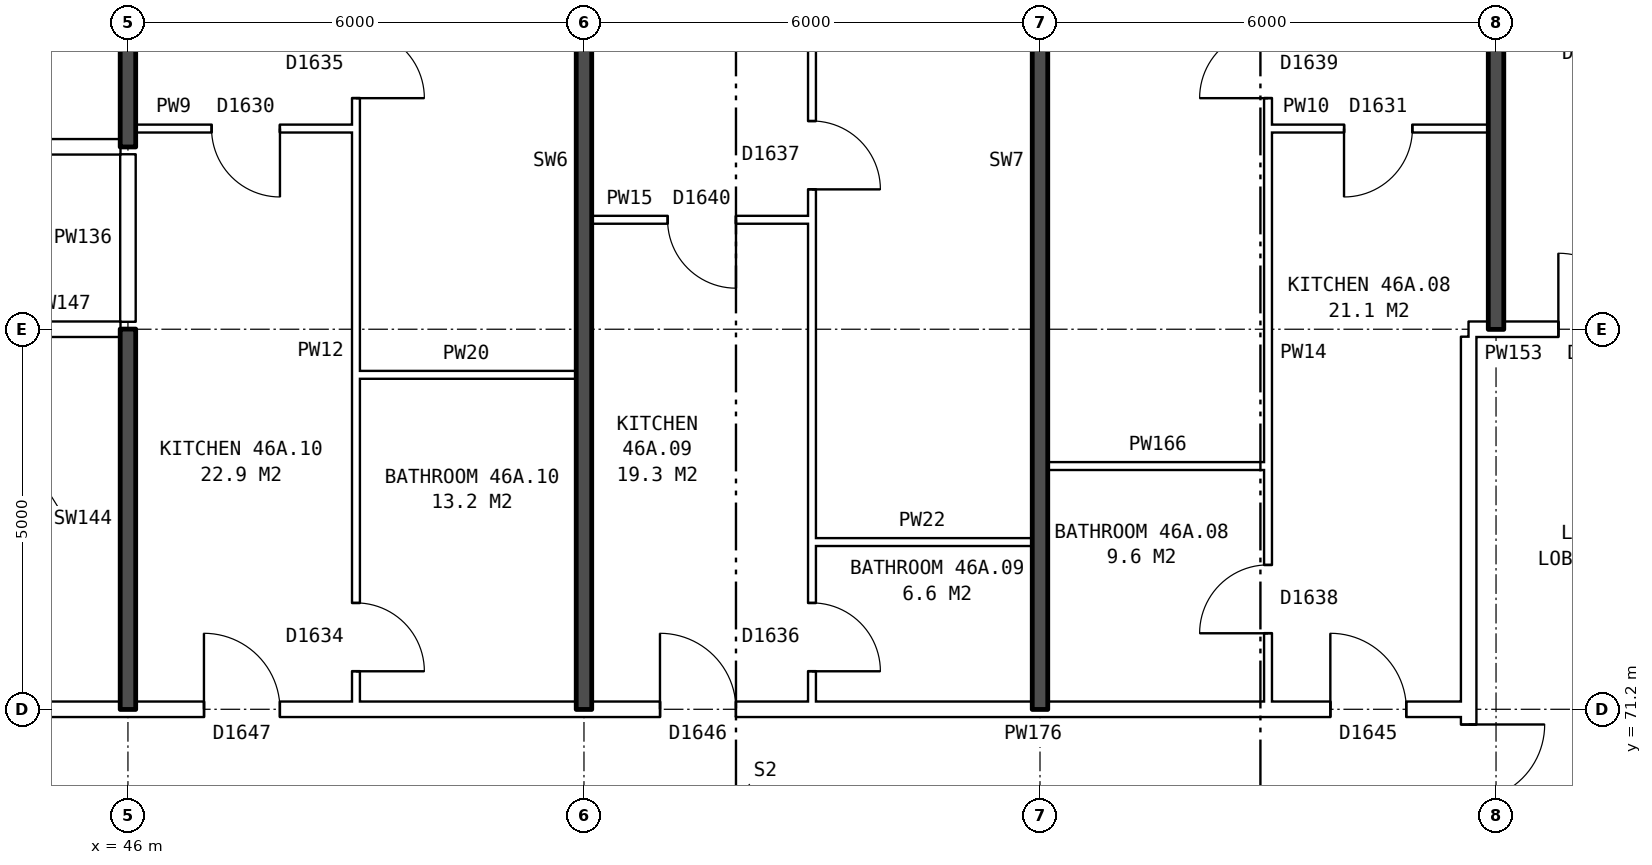
"""IFC4 building model, lengths in metres.
Left out: names, types, materials, properties, quantities, classifications, styles, units other than length and angle.
Written with IfcOpenShell. Run it as: python <this file> out.ifc"""

import sys

from ifc_helpers import new_model, si_unit, direction, frame, frame_2d, origin, place, context, subcontext, project, spatial, rectangle, extrude, element, fill, save


model = new_model("IFC4")
c1 = context("Model", 3, precision=1e-05, world=origin(), true_north=direction((0.0, 1.0)))
c2 = subcontext(c1, "Body", "Model", "MODEL_VIEW")
j1 = project(units=[si_unit("LENGTHUNIT", "METRE"), si_unit("PLANEANGLEUNIT", "RADIAN")], contexts=[c1])
p1 = place(None, origin())
s1 = spatial("IfcSite", under=j1, at=p1, CompositionType="ELEMENT")
p2 = place(p1, origin())
s2 = spatial("IfcBuilding", under=s1, at=p2, CompositionType="ELEMENT")
p3 = place(p2, frame((0.0, 0.0, 164.0)))
s3 = spatial("IfcBuildingStorey", under=s2, at=p3, CompositionType="ELEMENT", Elevation=164.0)
p4 = place(p3, frame((63.64, 63.9, 0.0), z_axis=(0.0, 0.0, 1.0), x_axis=(0.0, 1.0, 0.0)))
e1 = element("IfcWall", 1, at=p4, inside=s3, PredefinedType="PARTITIONING", context=c2, shape_type="SweptSolid", body=[
    extrude(rectangle(XDim=12.2, YDim=0.2, at=frame_2d((6.1, 0.0))), origin(), (0.0, 0.0, 1.0), 2.85),
])
p5 = place(p4, frame((5.1, 0.0, 0.0)))
e2 = element("IfcOpeningElement", 2, at=p5, cuts=e1, PredefinedType="OPENING", context=c2, shape_type="SweptSolid", body=[
    extrude(rectangle(XDim=2.0, YDim=2.1, at=frame_2d((1.0, 1.05))), frame((0.0, 0.11, 0.0), z_axis=(0.0, -1.0, 0.0), x_axis=(1.0, 0.0, 0.0)), (0.0, 0.0, 1.0), 0.22),
])
p6 = place(p3, frame((44.36, 71.2, 0.0), z_axis=(0.0, 0.0, 1.0), x_axis=(1.0, 0.0, 0.0)))
e3 = element("IfcWall", 3, at=p6, inside=s3, PredefinedType="PARTITIONING", context=c2, shape_type="SweptSolid", body=[
    extrude(rectangle(XDim=19.28, YDim=0.2, at=frame_2d((9.64, 0.0))), origin(), (0.0, 0.0, 1.0), 2.85),
])
p7 = place(p6, frame((17.46, 0.0, 0.0)))
e4 = element("IfcOpeningElement", 4, at=p7, cuts=e3, PredefinedType="OPENING", context=c2, shape_type="SweptSolid", body=[
    extrude(rectangle(XDim=1.0, YDim=2.1, at=frame_2d((0.5, 1.05))), frame((0.0, 0.11, 0.0), z_axis=(0.0, -1.0, 0.0), x_axis=(1.0, 0.0, 0.0)), (0.0, 0.0, 1.0), 0.22),
])
p8 = place(p6, frame((8.64, 0.0, 0.0)))
e5 = element("IfcOpeningElement", 5, at=p8, cuts=e3, PredefinedType="OPENING", context=c2, shape_type="SweptSolid", body=[
    extrude(rectangle(XDim=1.0, YDim=2.1, at=frame_2d((0.5, 1.05))), frame((0.0, 0.11, 0.0), z_axis=(0.0, -1.0, 0.0), x_axis=(1.0, 0.0, 0.0)), (0.0, 0.0, 1.0), 0.22),
])
p9 = place(p6, frame((2.64, 0.0, 0.0)))
e6 = element("IfcOpeningElement", 6, at=p9, cuts=e3, PredefinedType="OPENING", context=c2, shape_type="SweptSolid", body=[
    extrude(rectangle(XDim=1.0, YDim=2.1, at=frame_2d((0.5, 1.05))), frame((0.0, 0.11, 0.0), z_axis=(0.0, -1.0, 0.0), x_axis=(1.0, 0.0, 0.0)), (0.0, 0.0, 1.0), 0.22),
])
for number, where, z_axis, x_axis in (
    (7, (55.0, 73.4, 0.0), (0.0, 0.0, 1.0), (1.0, 0.0, 0.0)),
    (8, (58.1, 74.4, 0.0), (0.0, 0.0, 1.0), (1.0, 0.0, 0.0)),
    (9, (49.0, 75.6, 0.0), (0.0, 0.0, 1.0), (1.0, 0.0, 0.0)),
):
    element("IfcWall", number, at=place(p3, frame(where, z_axis=z_axis, x_axis=x_axis)), inside=s3, PredefinedType="PARTITIONING", context=c2, shape_type="SweptSolid", body=[
        extrude(rectangle(XDim=2.9, YDim=0.1, at=frame_2d((1.45, 0.0))), origin(), (0.0, 0.0, 1.0), 2.85),
    ])
p10 = place(p3, frame((44.36, 76.2, 0.0), z_axis=(0.0, 0.0, 1.0), x_axis=(1.0, 0.0, 0.0)))
e10 = element("IfcWall", 10, at=p10, inside=s3, PredefinedType="PARTITIONING", context=c2, shape_type="SweptSolid", body=[
    extrude(rectangle(XDim=1.54, YDim=0.2, at=frame_2d((0.77, 0.0))), origin(), (0.0, 0.0, 1.0), 2.85),
])
p11 = place(p3, frame((63.64, 76.2, 0.0), z_axis=(0.0, 0.0, 1.0), x_axis=(1.0, 0.0, 0.0)))
e11 = element("IfcWall", 11, at=p11, inside=s3, PredefinedType="PARTITIONING", context=c2, shape_type="SweptSolid", body=[
    extrude(rectangle(XDim=3.0, YDim=0.2, at=frame_2d((1.5, 0.0))), origin(), (0.0, 0.0, 1.0), 2.85),
])
p12 = place(p11, frame((1.18, 0.0, 0.0)))
e12 = element("IfcOpeningElement", 12, at=p12, cuts=e11, PredefinedType="OPENING", context=c2, shape_type="SweptSolid", body=[
    extrude(rectangle(XDim=1.0, YDim=2.1, at=frame_2d((0.5, 1.05))), frame((0.0, 0.11, 0.0), z_axis=(0.0, -1.0, 0.0), x_axis=(1.0, 0.0, 0.0)), (0.0, 0.0, 1.0), 0.22),
])
p13 = place(p3, frame((52.1, 77.64, 0.0), z_axis=(0.0, 0.0, 1.0), x_axis=(1.0, 0.0, 0.0)))
e13 = element("IfcWall", 13, at=p13, inside=s3, PredefinedType="PARTITIONING", context=c2, shape_type="SweptSolid", body=[
    extrude(rectangle(XDim=2.9, YDim=0.1, at=frame_2d((1.45, 0.0))), origin(), (0.0, 0.0, 1.0), 2.85),
])
p14 = place(p13, frame((1.0, 0.0, 0.0)))
e14 = element("IfcOpeningElement", 14, at=p14, cuts=e13, PredefinedType="OPENING", context=c2, shape_type="SweptSolid", body=[
    extrude(rectangle(XDim=0.9, YDim=2.1, at=frame_2d((0.45, 1.05))), frame((0.0, 0.06, 0.0), z_axis=(0.0, -1.0, 0.0), x_axis=(1.0, 0.0, 0.0)), (0.0, 0.0, 1.0), 0.12),
])
p15 = place(p3, frame((28.86, 78.6, 0.0), z_axis=(0.0, 0.0, 1.0), x_axis=(1.0, 0.0, 0.0)))
e15 = element("IfcWall", 15, at=p15, inside=s3, PredefinedType="PARTITIONING", context=c2, shape_type="SweptSolid", body=[
    extrude(rectangle(XDim=17.04, YDim=0.2, at=frame_2d((8.52, 0.0))), origin(), (0.0, 0.0, 1.0), 2.85),
])
p16 = place(p15, frame((14.59, 0.0, 0.0)))
e16 = element("IfcOpeningElement", 16, at=p16, cuts=e15, PredefinedType="OPENING", context=c2, shape_type="SweptSolid", body=[
    extrude(rectangle(XDim=1.0, YDim=2.1, at=frame_2d((0.5, 1.05))), frame((0.0, 0.11, 0.0), z_axis=(0.0, -1.0, 0.0), x_axis=(1.0, 0.0, 0.0)), (0.0, 0.0, 1.0), 0.22),
])
p17 = place(p15, frame((7.64, 0.0, 0.0)))
e17 = element("IfcOpeningElement", 17, at=p17, cuts=e15, PredefinedType="OPENING", context=c2, shape_type="SweptSolid", body=[
    extrude(rectangle(XDim=1.0, YDim=2.1, at=frame_2d((0.5, 1.05))), frame((0.0, 0.11, 0.0), z_axis=(0.0, -1.0, 0.0), x_axis=(1.0, 0.0, 0.0)), (0.0, 0.0, 1.0), 0.22),
])
p18 = place(p3, frame((46.1, 78.84, 0.0), z_axis=(0.0, 0.0, 1.0), x_axis=(1.0, 0.0, 0.0)))
e18 = element("IfcWall", 18, at=p18, inside=s3, PredefinedType="PARTITIONING", context=c2, shape_type="SweptSolid", body=[
    extrude(rectangle(XDim=2.9, YDim=0.1, at=frame_2d((1.45, 0.0))), origin(), (0.0, 0.0, 1.0), 2.85),
])
p19 = place(p18, frame((1.0, 0.0, 0.0)))
e19 = element("IfcOpeningElement", 19, at=p19, cuts=e18, PredefinedType="OPENING", context=c2, shape_type="SweptSolid", body=[
    extrude(rectangle(XDim=0.9, YDim=2.1, at=frame_2d((0.45, 1.05))), frame((0.0, 0.06, 0.0), z_axis=(0.0, -1.0, 0.0), x_axis=(1.0, 0.0, 0.0)), (0.0, 0.0, 1.0), 0.12),
])
p20 = place(p3, frame((61.0, 78.84, 0.0), z_axis=(0.0, 0.0, 1.0), x_axis=(1.0, 0.0, 0.0)))
e20 = element("IfcWall", 20, at=p20, inside=s3, PredefinedType="PARTITIONING", context=c2, shape_type="SweptSolid", body=[
    extrude(rectangle(XDim=2.9, YDim=0.1, at=frame_2d((1.45, 0.0))), origin(), (0.0, 0.0, 1.0), 2.85),
])
p21 = place(p20, frame((1.0, 0.0, 0.0)))
e21 = element("IfcOpeningElement", 21, at=p21, cuts=e20, PredefinedType="OPENING", context=c2, shape_type="SweptSolid", body=[
    extrude(rectangle(XDim=0.9, YDim=2.1, at=frame_2d((0.45, 1.05))), frame((0.0, 0.06, 0.0), z_axis=(0.0, -1.0, 0.0), x_axis=(1.0, 0.0, 0.0)), (0.0, 0.0, 1.0), 0.12),
])
p22 = place(p3, frame((46.0, 71.2, 0.0), z_axis=(0.0, 0.0, 1.0), x_axis=(0.0, 1.0, 0.0)))
e22 = element("IfcWall", 22, at=p22, inside=s3, PredefinedType="SOLIDWALL", context=c2, shape_type="SweptSolid", body=[
    extrude(rectangle(XDim=5.0, YDim=0.2, at=frame_2d((2.5, 0.0))), origin(), (0.0, 0.0, 1.0), 2.85),
])
p23 = place(p3, frame((46.0, 76.3, 0.0), z_axis=(0.0, 0.0, 1.0), x_axis=(0.0, 1.0, 0.0)))
e23 = element("IfcWall", 23, at=p23, inside=s3, PredefinedType="PARTITIONING", context=c2, shape_type="SweptSolid", body=[
    extrude(rectangle(XDim=2.2, YDim=0.2, at=frame_2d((1.1, 0.0))), origin(), (0.0, 0.0, 1.0), 2.85),
])
p24 = place(p3, frame((46.0, 78.6, 0.0), z_axis=(0.0, 0.0, 1.0), x_axis=(0.0, 1.0, 0.0)))
e24 = element("IfcWall", 24, at=p24, inside=s3, PredefinedType="SOLIDWALL", context=c2, shape_type="SweptSolid", body=[
    extrude(rectangle(XDim=7.04, YDim=0.2, at=frame_2d((3.52, 0.0))), origin(), (0.0, 0.0, 1.0), 2.85),
])
p25 = place(p3, frame((49.0, 71.3, 0.0), z_axis=(0.0, 0.0, 1.0), x_axis=(0.0, 1.0, 0.0)))
e25 = element("IfcWall", 25, at=p25, inside=s3, PredefinedType="PARTITIONING", context=c2, shape_type="SweptSolid", body=[
    extrude(rectangle(XDim=14.34, YDim=0.1, at=frame_2d((7.17, 0.0))), origin(), (0.0, 0.0, 1.0), 2.85),
])
p26 = place(p25, frame((7.94, 0.0, 0.0)))
e26 = element("IfcOpeningElement", 26, at=p26, cuts=e25, PredefinedType="OPENING", context=c2, shape_type="SweptSolid", body=[
    extrude(rectangle(XDim=0.9, YDim=2.1, at=frame_2d((0.45, 1.05))), frame((0.0, 0.06, 0.0), z_axis=(0.0, -1.0, 0.0), x_axis=(1.0, 0.0, 0.0)), (0.0, 0.0, 1.0), 0.12),
])
p27 = place(p25, frame((0.4, 0.0, 0.0)))
e27 = element("IfcOpeningElement", 27, at=p27, cuts=e25, PredefinedType="OPENING", context=c2, shape_type="SweptSolid", body=[
    extrude(rectangle(XDim=0.9, YDim=2.1, at=frame_2d((0.45, 1.05))), frame((0.0, 0.06, 0.0), z_axis=(0.0, -1.0, 0.0), x_axis=(1.0, 0.0, 0.0)), (0.0, 0.0, 1.0), 0.12),
])
p28 = place(p3, frame((52.0, 71.2, 0.0), z_axis=(0.0, 0.0, 1.0), x_axis=(0.0, 1.0, 0.0)))
e28 = element("IfcWall", 28, at=p28, inside=s3, PredefinedType="SOLIDWALL", context=c2, shape_type="SweptSolid", body=[
    extrude(rectangle(XDim=14.44, YDim=0.2, at=frame_2d((7.22, 0.0))), origin(), (0.0, 0.0, 1.0), 2.85),
])
p29 = place(p3, frame((55.0, 71.3, 0.0), z_axis=(0.0, 0.0, 1.0), x_axis=(0.0, 1.0, 0.0)))
e29 = element("IfcWall", 29, at=p29, inside=s3, PredefinedType="PARTITIONING", context=c2, shape_type="SweptSolid", body=[
    extrude(rectangle(XDim=14.34, YDim=0.1, at=frame_2d((7.17, 0.0))), origin(), (0.0, 0.0, 1.0), 2.85),
])
p30 = place(p29, frame((6.74, 0.0, 0.0)))
e30 = element("IfcOpeningElement", 30, at=p30, cuts=e29, PredefinedType="OPENING", context=c2, shape_type="SweptSolid", body=[
    extrude(rectangle(XDim=0.9, YDim=2.1, at=frame_2d((0.45, 1.05))), frame((0.0, 0.06, 0.0), z_axis=(0.0, -1.0, 0.0), x_axis=(1.0, 0.0, 0.0)), (0.0, 0.0, 1.0), 0.12),
])
p31 = place(p29, frame((0.4, 0.0, 0.0)))
e31 = element("IfcOpeningElement", 31, at=p31, cuts=e29, PredefinedType="OPENING", context=c2, shape_type="SweptSolid", body=[
    extrude(rectangle(XDim=0.9, YDim=2.1, at=frame_2d((0.45, 1.05))), frame((0.0, 0.06, 0.0), z_axis=(0.0, -1.0, 0.0), x_axis=(1.0, 0.0, 0.0)), (0.0, 0.0, 1.0), 0.12),
])
p32 = place(p3, frame((58.0, 71.2, 0.0), z_axis=(0.0, 0.0, 1.0), x_axis=(0.0, 1.0, 0.0)))
e32 = element("IfcWall", 32, at=p32, inside=s3, PredefinedType="SOLIDWALL", context=c2, shape_type="SweptSolid", body=[
    extrude(rectangle(XDim=14.44, YDim=0.2, at=frame_2d((7.22, 0.0))), origin(), (0.0, 0.0, 1.0), 2.85),
])
p33 = place(p3, frame((61.0, 71.3, 0.0), z_axis=(0.0, 0.0, 1.0), x_axis=(0.0, 1.0, 0.0)))
e33 = element("IfcWall", 33, at=p33, inside=s3, PredefinedType="PARTITIONING", context=c2, shape_type="SweptSolid", body=[
    extrude(rectangle(XDim=14.34, YDim=0.1, at=frame_2d((7.17, 0.0))), origin(), (0.0, 0.0, 1.0), 2.85),
])
p34 = place(p33, frame((7.94, 0.0, 0.0)))
e34 = element("IfcOpeningElement", 34, at=p34, cuts=e33, PredefinedType="OPENING", context=c2, shape_type="SweptSolid", body=[
    extrude(rectangle(XDim=0.9, YDim=2.1, at=frame_2d((0.45, 1.05))), frame((0.0, 0.06, 0.0), z_axis=(0.0, -1.0, 0.0), x_axis=(1.0, 0.0, 0.0)), (0.0, 0.0, 1.0), 0.12),
])
p35 = place(p33, frame((0.9, 0.0, 0.0)))
e35 = element("IfcOpeningElement", 35, at=p35, cuts=e33, PredefinedType="OPENING", context=c2, shape_type="SweptSolid", body=[
    extrude(rectangle(XDim=0.9, YDim=2.1, at=frame_2d((0.45, 1.05))), frame((0.0, 0.06, 0.0), z_axis=(0.0, -1.0, 0.0), x_axis=(1.0, 0.0, 0.0)), (0.0, 0.0, 1.0), 0.12),
])
p36 = place(p3, frame((64.0, 76.2, 0.0), z_axis=(0.0, 0.0, 1.0), x_axis=(0.0, 1.0, 0.0)))
e36 = element("IfcWall", 36, at=p36, inside=s3, PredefinedType="SOLIDWALL", context=c2, shape_type="SweptSolid", body=[
    extrude(rectangle(XDim=9.44, YDim=0.2, at=frame_2d((4.72, 0.0))), origin(), (0.0, 0.0, 1.0), 2.85),
])
p37 = place(p5, frame((2.0, 0.0, 0.0), z_axis=(0.0, 0.0, 1.0), x_axis=(-1.0, 0.0, 0.0)))
e37 = element("IfcDoor", 37, at=p37, inside=s3, OperationType="DOUBLE_DOOR_SINGLE_SWING", PredefinedType="DOOR", context=c2, shape_type="SweptSolid", body=[
    extrude(rectangle(XDim=2.0, YDim=2.1, at=frame_2d((1.0, 1.05))), frame((0.0, 0.025, 0.0), z_axis=(0.0, -1.0, 0.0), x_axis=(1.0, 0.0, 0.0)), (0.0, 0.0, 1.0), 0.05),
])
fill(e2, e37)
p38 = place(p12, origin())
e38 = element("IfcDoor", 38, at=p38, inside=s3, OperationType="SINGLE_SWING_LEFT", PredefinedType="DOOR", context=c2, shape_type="SweptSolid", body=[
    extrude(rectangle(XDim=1.0, YDim=2.1, at=frame_2d((0.5, 1.05))), frame((0.0, 0.025, 0.0), z_axis=(0.0, -1.0, 0.0), x_axis=(1.0, 0.0, 0.0)), (0.0, 0.0, 1.0), 0.05),
])
fill(e12, e38)
p39 = place(p34, origin())
e39 = element("IfcDoor", 39, at=p39, inside=s3, OperationType="SINGLE_SWING_LEFT", PredefinedType="DOOR", context=c2, shape_type="SweptSolid", body=[
    extrude(rectangle(XDim=0.9, YDim=2.1, at=frame_2d((0.45, 1.05))), frame((0.0, 0.025, 0.0), z_axis=(0.0, -1.0, 0.0), x_axis=(1.0, 0.0, 0.0)), (0.0, 0.0, 1.0), 0.05),
])
fill(e34, e39)
p40 = place(p7, origin())
e40 = element("IfcDoor", 40, at=p40, inside=s3, OperationType="SINGLE_SWING_LEFT", PredefinedType="DOOR", context=c2, shape_type="SweptSolid", body=[
    extrude(rectangle(XDim=1.0, YDim=2.1, at=frame_2d((0.5, 1.05))), frame((0.0, 0.025, 0.0), z_axis=(0.0, -1.0, 0.0), x_axis=(1.0, 0.0, 0.0)), (0.0, 0.0, 1.0), 0.05),
])
fill(e4, e40)
p41 = place(p21, frame((0.9, 0.0, 0.0), z_axis=(0.0, 0.0, 1.0), x_axis=(-1.0, 0.0, 0.0)))
e41 = element("IfcDoor", 41, at=p41, inside=s3, OperationType="SINGLE_SWING_RIGHT", PredefinedType="DOOR", context=c2, shape_type="SweptSolid", body=[
    extrude(rectangle(XDim=0.9, YDim=2.1, at=frame_2d((0.45, 1.05))), frame((0.0, 0.025, 0.0), z_axis=(0.0, -1.0, 0.0), x_axis=(1.0, 0.0, 0.0)), (0.0, 0.0, 1.0), 0.05),
])
fill(e21, e41)
p42 = place(p35, origin())
e42 = element("IfcDoor", 42, at=p42, inside=s3, OperationType="SINGLE_SWING_LEFT", PredefinedType="DOOR", context=c2, shape_type="SweptSolid", body=[
    extrude(rectangle(XDim=0.9, YDim=2.1, at=frame_2d((0.45, 1.05))), frame((0.0, 0.025, 0.0), z_axis=(0.0, -1.0, 0.0), x_axis=(1.0, 0.0, 0.0)), (0.0, 0.0, 1.0), 0.05),
])
fill(e35, e42)
p43 = place(p30, frame((0.9, 0.0, 0.0), z_axis=(0.0, 0.0, 1.0), x_axis=(-1.0, 0.0, 0.0)))
e43 = element("IfcDoor", 43, at=p43, inside=s3, OperationType="SINGLE_SWING_RIGHT", PredefinedType="DOOR", context=c2, shape_type="SweptSolid", body=[
    extrude(rectangle(XDim=0.9, YDim=2.1, at=frame_2d((0.45, 1.05))), frame((0.0, 0.025, 0.0), z_axis=(0.0, -1.0, 0.0), x_axis=(1.0, 0.0, 0.0)), (0.0, 0.0, 1.0), 0.05),
])
fill(e30, e43)
p44 = place(p8, origin())
e44 = element("IfcDoor", 44, at=p44, inside=s3, OperationType="SINGLE_SWING_LEFT", PredefinedType="DOOR", context=c2, shape_type="SweptSolid", body=[
    extrude(rectangle(XDim=1.0, YDim=2.1, at=frame_2d((0.5, 1.05))), frame((0.0, 0.025, 0.0), z_axis=(0.0, -1.0, 0.0), x_axis=(1.0, 0.0, 0.0)), (0.0, 0.0, 1.0), 0.05),
])
fill(e5, e44)
p45 = place(p14, frame((0.9, 0.0, 0.0), z_axis=(0.0, 0.0, 1.0), x_axis=(-1.0, 0.0, 0.0)))
e45 = element("IfcDoor", 45, at=p45, inside=s3, OperationType="SINGLE_SWING_LEFT", PredefinedType="DOOR", context=c2, shape_type="SweptSolid", body=[
    extrude(rectangle(XDim=0.9, YDim=2.1, at=frame_2d((0.45, 1.05))), frame((0.0, 0.025, 0.0), z_axis=(0.0, -1.0, 0.0), x_axis=(1.0, 0.0, 0.0)), (0.0, 0.0, 1.0), 0.05),
])
fill(e14, e45)
p46 = place(p31, frame((0.9, 0.0, 0.0), z_axis=(0.0, 0.0, 1.0), x_axis=(-1.0, 0.0, 0.0)))
e46 = element("IfcDoor", 46, at=p46, inside=s3, OperationType="SINGLE_SWING_RIGHT", PredefinedType="DOOR", context=c2, shape_type="SweptSolid", body=[
    extrude(rectangle(XDim=0.9, YDim=2.1, at=frame_2d((0.45, 1.05))), frame((0.0, 0.025, 0.0), z_axis=(0.0, -1.0, 0.0), x_axis=(1.0, 0.0, 0.0)), (0.0, 0.0, 1.0), 0.05),
])
fill(e31, e46)
p47 = place(p26, frame((0.9, 0.0, 0.0), z_axis=(0.0, 0.0, 1.0), x_axis=(-1.0, 0.0, 0.0)))
e47 = element("IfcDoor", 47, at=p47, inside=s3, OperationType="SINGLE_SWING_RIGHT", PredefinedType="DOOR", context=c2, shape_type="SweptSolid", body=[
    extrude(rectangle(XDim=0.9, YDim=2.1, at=frame_2d((0.45, 1.05))), frame((0.0, 0.025, 0.0), z_axis=(0.0, -1.0, 0.0), x_axis=(1.0, 0.0, 0.0)), (0.0, 0.0, 1.0), 0.05),
])
fill(e26, e47)
p48 = place(p9, origin())
e48 = element("IfcDoor", 48, at=p48, inside=s3, OperationType="SINGLE_SWING_LEFT", PredefinedType="DOOR", context=c2, shape_type="SweptSolid", body=[
    extrude(rectangle(XDim=1.0, YDim=2.1, at=frame_2d((0.5, 1.05))), frame((0.0, 0.025, 0.0), z_axis=(0.0, -1.0, 0.0), x_axis=(1.0, 0.0, 0.0)), (0.0, 0.0, 1.0), 0.05),
])
fill(e6, e48)
p49 = place(p19, frame((0.9, 0.0, 0.0), z_axis=(0.0, 0.0, 1.0), x_axis=(-1.0, 0.0, 0.0)))
e49 = element("IfcDoor", 49, at=p49, inside=s3, OperationType="SINGLE_SWING_LEFT", PredefinedType="DOOR", context=c2, shape_type="SweptSolid", body=[
    extrude(rectangle(XDim=0.9, YDim=2.1, at=frame_2d((0.45, 1.05))), frame((0.0, 0.025, 0.0), z_axis=(0.0, -1.0, 0.0), x_axis=(1.0, 0.0, 0.0)), (0.0, 0.0, 1.0), 0.05),
])
fill(e19, e49)
p50 = place(p27, frame((0.9, 0.0, 0.0), z_axis=(0.0, 0.0, 1.0), x_axis=(-1.0, 0.0, 0.0)))
e50 = element("IfcDoor", 50, at=p50, inside=s3, OperationType="SINGLE_SWING_RIGHT", PredefinedType="DOOR", context=c2, shape_type="SweptSolid", body=[
    extrude(rectangle(XDim=0.9, YDim=2.1, at=frame_2d((0.45, 1.05))), frame((0.0, 0.025, 0.0), z_axis=(0.0, -1.0, 0.0), x_axis=(1.0, 0.0, 0.0)), (0.0, 0.0, 1.0), 0.05),
])
fill(e27, e50)
save(model, sys.argv[1])
